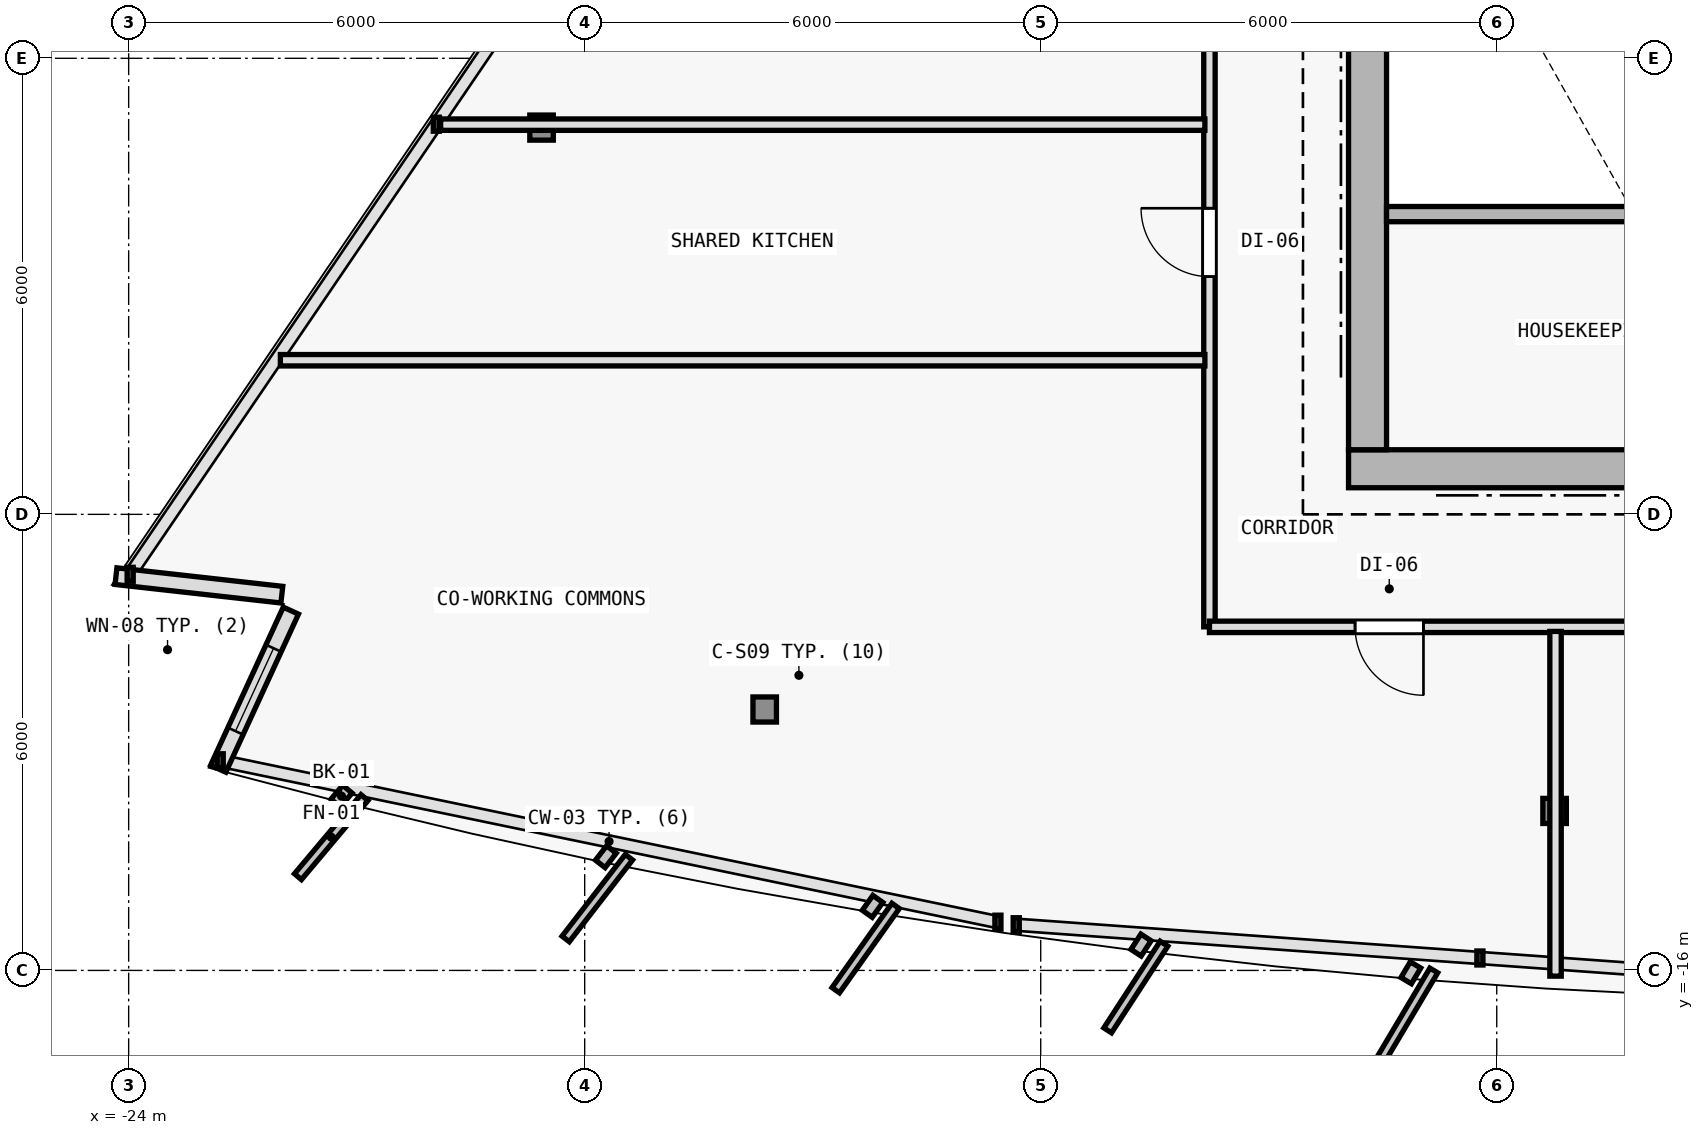
"""IFC4 building model, lengths in metres.
Left out: names, types, materials, properties, quantities, classifications, styles, units other than length and angle.
Written with IfcOpenShell. Run it as: python <this file> out.ifc"""

import sys

from ifc_helpers import new_model, si_unit, direction, frame, frame_2d, origin, origin_2d, place, context, subcontext, project, spatial, rectangle, i_section, extrude, element, fill, save


model = new_model("IFC4")
c1 = context("Model", 3, precision=1e-05, world=origin(), true_north=direction((0.0, 1.0)))
c2 = subcontext(c1, "Body", "Model", "MODEL_VIEW")
j1 = project(units=[si_unit("LENGTHUNIT", "METRE"), si_unit("PLANEANGLEUNIT", "RADIAN")], contexts=[c1])
p1 = place(None, origin())
s1 = spatial("IfcSite", under=j1, at=p1, CompositionType="ELEMENT")
p2 = place(p1, origin())
s2 = spatial("IfcBuilding", under=s1, at=p2, CompositionType="ELEMENT")
p3 = place(p2, frame((0.0, 0.0, 265.2)))
s3 = spatial("IfcBuildingStorey", under=s2, at=p3, CompositionType="ELEMENT", Elevation=265.2)
p4 = place(p3, frame((-7.7, -9.4, 0.0), z_axis=(0.0, 0.0, 1.0), x_axis=(1.0, 0.0, 0.0)))
e1 = element("IfcColumn", 1, at=p4, inside=s3, PredefinedType="COLUMN", context=c2, shape_type="SweptSolid", body=[
    extrude(i_section(OverallWidth=0.374, OverallDepth=0.372, WebThickness=0.012, FlangeThickness=0.02, FilletRadius=0.015, at=origin_2d()), origin(), (0.0, 0.0, 1.0), 3.6),
])
p5 = place(p3, frame((-15.632, -12.567, 0.006), z_axis=(0.020596292833, 0.033511459955, 0.999226087917), x_axis=(-0.851954850327, 0.523615252838, 0.0)))
e2 = element("IfcColumn", 2, at=p5, inside=s3, PredefinedType="COLUMN", context=c2, shape_type="SweptSolid", body=[
    extrude(i_section(OverallWidth=0.309, OverallDepth=0.33, WebThickness=0.011, FlangeThickness=0.019, FilletRadius=0.027, at=origin_2d()), origin(), (0.0, 0.0, 1.0), 3.592),
])
p6 = place(p3, frame((-5.239, -13.902, 0.006), z_axis=(0.006934288159, 0.035283289748, 0.999353293441), x_axis=(-0.981229659911, 0.192842823335, 0.0)))
e3 = element("IfcColumn", 3, at=p6, inside=s3, PredefinedType="COLUMN", context=c2, shape_type="SweptSolid", body=[
    extrude(i_section(OverallWidth=0.309, OverallDepth=0.33, WebThickness=0.011, FlangeThickness=0.019, FilletRadius=0.027, at=origin_2d()), origin(), (0.0, 0.0, 1.0), 3.591),
])
p7 = place(p3, frame((-18.568, -4.912, 0.006), z_axis=(0.025224163578, 0.021620711639, 0.999447990843), x_axis=(-0.650791373456, 0.759256602365, 0.0)))
e4 = element("IfcColumn", 4, at=p7, inside=s3, PredefinedType="COLUMN", context=c2, shape_type="SweptSolid", body=[
    extrude(i_section(OverallWidth=0.309, OverallDepth=0.33, WebThickness=0.011, FlangeThickness=0.019, FilletRadius=0.027, at=origin_2d()), origin(), (0.0, 0.0, 1.0), 3.591),
])
p8 = place(p3, frame((-21.985, -11.057, 0.0), z_axis=(0.0, 0.0, 1.0), x_axis=(-0.993823926228, 0.110968480463, 0.0)))
e5 = element("IfcWall", 5, at=p8, inside=s3, PredefinedType="SOLIDWALL", context=c2, shape_type="SweptSolid", body=[
    extrude(rectangle(XDim=2.196, YDim=0.22, at=frame_2d((1.098, 0.0))), origin(), (0.0, 0.0, 1.0), 3.35),
])
p9 = place(p3, frame((-22.822, -13.347, 0.0), z_axis=(0.0, 0.0, 1.0), x_axis=(0.417447808253, 0.908700900949, 0.0)))
e6 = element("IfcWall", 6, at=p9, inside=s3, PredefinedType="SOLIDWALL", context=c2, shape_type="SweptSolid", body=[
    extrude(rectangle(XDim=2.289, YDim=0.22, at=frame_2d((1.145, 0.0))), origin(), (0.0, 0.0, 1.0), 3.35),
])
p10 = place(p9, frame((0.544, 0.0, 0.62)))
e7 = element("IfcOpeningElement", 7, at=p10, cuts=e6, PredefinedType="OPENING", context=c2, shape_type="SweptSolid", body=[
    extrude(rectangle(XDim=1.2, YDim=1.8, at=frame_2d((0.6, 0.9))), frame((0.0, 0.12, 0.0), z_axis=(0.0, -1.0, 0.0), x_axis=(1.0, 0.0, 0.0)), (0.0, 0.0, 1.0), 0.24),
])
p11 = place(p3, frame((-7.95, -9.4, 0.0), z_axis=(0.0, 0.0, 1.0), x_axis=(1.0, 0.0, 0.0)))
e8 = element("IfcWall", 8, at=p11, inside=s3, PredefinedType="SHEAR", context=c2, shape_type="SweptSolid", body=[
    extrude(rectangle(XDim=15.9, YDim=0.5, at=frame_2d((7.95, 0.0))), origin(), (0.0, 0.0, 1.0), 3.35),
])
p12 = place(p11, frame((9.6, 0.0, 0.0)))
e9 = element("IfcOpeningElement", 9, at=p12, cuts=e8, PredefinedType="OPENING", context=c2, shape_type="SweptSolid", body=[
    extrude(rectangle(XDim=1.5, YDim=2.2, at=frame_2d((0.75, 1.1))), frame((0.0, 0.26, 0.0), z_axis=(0.0, -1.0, 0.0), x_axis=(1.0, 0.0, 0.0)), (0.0, 0.0, 1.0), 0.52),
])
p13 = place(p3, frame((-7.7, -9.15, 0.0), z_axis=(0.0, 0.0, 1.0), x_axis=(0.0, 1.0, 0.0)))
e10 = element("IfcWall", 10, at=p13, inside=s3, PredefinedType="SHEAR", context=c2, shape_type="SweptSolid", body=[
    extrude(rectangle(XDim=19.1, YDim=0.5, at=frame_2d((9.55, 0.0))), origin(), (0.0, 0.0, 1.0), 3.35),
])
p14 = place(p13, frame((12.7, 0.0, 0.0)))
e11 = element("IfcOpeningElement", 11, at=p14, cuts=e10, PredefinedType="OPENING", context=c2, shape_type="SweptSolid", body=[
    extrude(rectangle(XDim=1.1, YDim=2.15, at=frame_2d((0.55, 1.075))), frame((0.0, 0.26, 0.0), z_axis=(0.0, -1.0, 0.0), x_axis=(1.0, 0.0, 0.0)), (0.0, 0.0, 1.0), 0.52),
])
p15 = place(p3, frame((-7.45, -6.05, 0.0), z_axis=(0.0, 0.0, 1.0), x_axis=(1.0, 0.0, 0.0)))
e12 = element("IfcWall", 12, at=p15, inside=s3, PredefinedType="SOLIDWALL", context=c2, shape_type="SweptSolid", body=[
    extrude(rectangle(XDim=3.4, YDim=0.2, at=frame_2d((1.7, 0.0))), origin(), (0.0, 0.0, 1.0), 3.35),
])
p16 = place(p3, frame((-9.78, -11.48, 0.0), z_axis=(0.0, 0.0, 1.0), x_axis=(0.0, 1.0, 0.0)))
e13 = element("IfcWall", 13, at=p16, inside=s3, PredefinedType="PARTITIONING", context=c2, shape_type="SweptSolid", body=[
    extrude(rectangle(XDim=19.706, YDim=0.15, at=frame_2d((9.853, 0.0))), origin(), (0.0, 0.0, 1.0), 2.725),
])
p17 = place(p16, frame((4.607, 0.0, 0.0)))
e14 = element("IfcOpeningElement", 14, at=p17, cuts=e13, PredefinedType="OPENING", context=c2, shape_type="SweptSolid", body=[
    extrude(rectangle(XDim=0.9, YDim=2.1, at=frame_2d((0.45, 1.05))), frame((0.0, 0.085, 0.0), z_axis=(0.0, -1.0, 0.0), x_axis=(1.0, 0.0, 0.0)), (0.0, 0.0, 1.0), 0.17),
])
p18 = place(p3, frame((9.78, -11.48, 0.0), z_axis=(0.0, 0.0, 1.0), x_axis=(-1.0, 0.0, 0.0)))
e15 = element("IfcWall", 15, at=p18, inside=s3, PredefinedType="PARTITIONING", context=c2, shape_type="SweptSolid", body=[
    extrude(rectangle(XDim=19.56, YDim=0.15, at=frame_2d((9.78, 0.0))), origin(), (0.0, 0.0, 1.0), 2.775),
])
p19 = place(p18, frame((16.744, 0.0, 0.0)))
e16 = element("IfcOpeningElement", 16, at=p19, cuts=e15, PredefinedType="OPENING", context=c2, shape_type="SweptSolid", body=[
    extrude(rectangle(XDim=0.9, YDim=2.1, at=frame_2d((0.45, 1.05))), frame((0.0, 0.085, 0.0), z_axis=(0.0, -1.0, 0.0), x_axis=(1.0, 0.0, 0.0)), (0.0, 0.0, 1.0), 0.17),
])
p20 = place(p18, frame((12.964, 0.0, 0.0)))
e17 = element("IfcOpeningElement", 17, at=p20, cuts=e15, PredefinedType="OPENING", context=c2, shape_type="SweptSolid", body=[
    extrude(rectangle(XDim=0.9, YDim=2.1, at=frame_2d((0.45, 1.05))), frame((0.0, 0.085, 0.0), z_axis=(0.0, -1.0, 0.0), x_axis=(1.0, 0.0, 0.0)), (0.0, 0.0, 1.0), 0.17),
])
p21 = place(p18, frame((9.78, 0.0, 0.0)))
e18 = element("IfcOpeningElement", 18, at=p21, cuts=e15, PredefinedType="OPENING", context=c2, shape_type="SweptSolid", body=[
    extrude(rectangle(XDim=0.9, YDim=2.1, at=frame_2d((0.45, 1.05))), frame((0.0, 0.085, 0.0), z_axis=(0.0, -1.0, 0.0), x_axis=(1.0, 0.0, 0.0)), (0.0, 0.0, 1.0), 0.17),
])
p22 = place(p18, frame((6.146, 0.0, 0.0)))
e19 = element("IfcOpeningElement", 19, at=p22, cuts=e15, PredefinedType="OPENING", context=c2, shape_type="SweptSolid", body=[
    extrude(rectangle(XDim=0.9, YDim=2.1, at=frame_2d((0.45, 1.05))), frame((0.0, 0.085, 0.0), z_axis=(0.0, -1.0, 0.0), x_axis=(1.0, 0.0, 0.0)), (0.0, 0.0, 1.0), 0.17),
])
p23 = place(p18, frame((1.916, 0.0, 0.0)))
e20 = element("IfcOpeningElement", 20, at=p23, cuts=e15, PredefinedType="OPENING", context=c2, shape_type="SweptSolid", body=[
    extrude(rectangle(XDim=0.9, YDim=2.1, at=frame_2d((0.45, 1.05))), frame((0.0, 0.085, 0.0), z_axis=(0.0, -1.0, 0.0), x_axis=(1.0, 0.0, 0.0)), (0.0, 0.0, 1.0), 0.17),
])
p24 = place(p3, frame((-5.227, -11.54, 0.0), z_axis=(0.0, 0.0, 1.0), x_axis=(0.0, -1.0, 0.0)))
e21 = element("IfcWall", 21, at=p24, inside=s3, PredefinedType="PARTITIONING", context=c2, shape_type="SweptSolid", body=[
    extrude(rectangle(XDim=4.535, YDim=0.15, at=frame_2d((2.268, 0.0))), origin(), (0.0, 0.0, 1.0), 3.015),
])
p25 = place(p3, frame((-9.84, -4.873, 0.0), z_axis=(0.0, 0.0, 1.0), x_axis=(-1.0, 0.0, 0.0)))
e22 = element("IfcWall", 22, at=p25, inside=s3, PredefinedType="PARTITIONING", context=c2, shape_type="SweptSolid", body=[
    extrude(rectangle(XDim=10.055, YDim=0.15, at=frame_2d((5.028, 0.0))), origin(), (0.0, 0.0, 1.0), 2.725),
])
p26 = place(p3, frame((-9.84, -7.972, 0.0), z_axis=(0.0, 0.0, 1.0), x_axis=(-1.0, 0.0, 0.0)))
e23 = element("IfcWall", 23, at=p26, inside=s3, PredefinedType="PARTITIONING", context=c2, shape_type="SweptSolid", body=[
    extrude(rectangle(XDim=12.164, YDim=0.15, at=frame_2d((6.082, 0.0))), origin(), (0.0, 0.0, 1.0), 2.725),
])
p27 = place(p10, origin())
e24 = element("IfcWindow", 24, at=p27, inside=s3, PartitioningType="SINGLE_PANEL", PredefinedType="WINDOW", context=c2, shape_type="SweptSolid", body=[
    extrude(rectangle(XDim=1.2, YDim=1.8, at=frame_2d((0.6, 0.9))), frame((0.0, 0.03, 0.0), z_axis=(0.0, -1.0, 0.0), x_axis=(1.0, 0.0, 0.0)), (0.0, 0.0, 1.0), 0.06),
])
fill(e7, e24)
p28 = place(p17, origin())
e25 = element("IfcDoor", 25, at=p28, inside=s3, OperationType="SINGLE_SWING_RIGHT", PredefinedType="DOOR", context=c2, shape_type="SweptSolid", body=[
    extrude(rectangle(XDim=0.9, YDim=2.1, at=frame_2d((0.45, 1.05))), frame((0.0, 0.025, 0.0), z_axis=(0.0, -1.0, 0.0), x_axis=(1.0, 0.0, 0.0)), (0.0, 0.0, 1.0), 0.05),
])
fill(e14, e25)
p29 = place(p19, origin())
e26 = element("IfcDoor", 26, at=p29, inside=s3, OperationType="SINGLE_SWING_LEFT", PredefinedType="DOOR", context=c2, shape_type="SweptSolid", body=[
    extrude(rectangle(XDim=0.9, YDim=2.1, at=frame_2d((0.45, 1.05))), frame((0.0, 0.025, 0.0), z_axis=(0.0, -1.0, 0.0), x_axis=(1.0, 0.0, 0.0)), (0.0, 0.0, 1.0), 0.05),
])
fill(e16, e26)
save(model, sys.argv[1])
